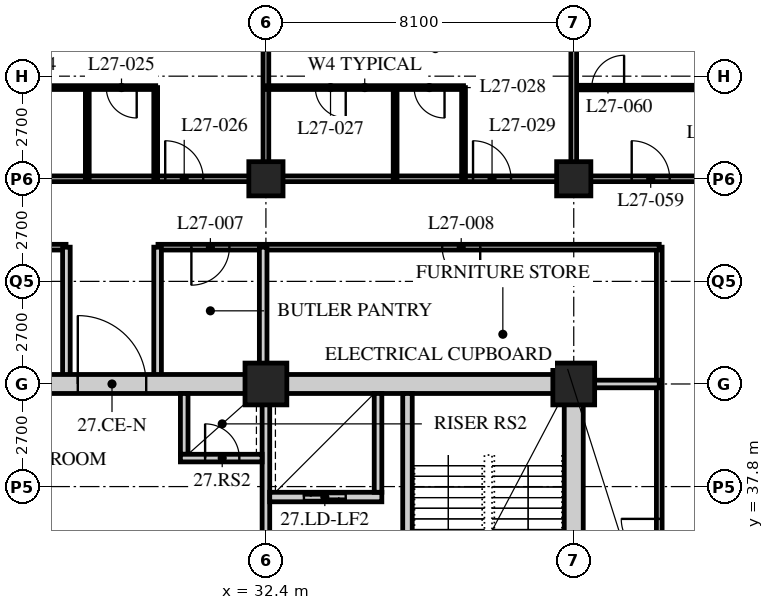
"""IFC4 building model, lengths in metres.
Left out: names, types, materials, properties, quantities, classifications, styles, units other than length and angle.
Written with IfcOpenShell. Run it as: python <this file> out.ifc"""

import sys

from ifc_helpers import new_model, si_unit, direction, frame, frame_2d, origin, origin_2d, place, context, subcontext, project, spatial, rectangle, hollow_rectangle, extrude, element, fill, save


model = new_model("IFC4")
c1 = context("Model", 3, precision=1e-05, world=origin(), true_north=direction((0.0, 1.0)))
c2 = subcontext(c1, "Body", "Model", "MODEL_VIEW")
j1 = project(units=[si_unit("LENGTHUNIT", "METRE"), si_unit("PLANEANGLEUNIT", "RADIAN")], contexts=[c1])
p1 = place(None, origin())
s1 = spatial("IfcSite", under=j1, at=p1, CompositionType="ELEMENT")
p2 = place(p1, origin())
s2 = spatial("IfcBuilding", under=s1, at=p2, CompositionType="ELEMENT")
p3 = place(p2, frame((0.0, 0.0, 110.2)))
s3 = spatial("IfcBuildingStorey", under=s2, at=p3, CompositionType="ELEMENT", Elevation=110.2)
p4 = place(p3, frame((32.4, 40.5, 0.0), z_axis=(0.0, 0.0, 1.0), x_axis=(1.0, 0.0, 0.0)))
e1 = element("IfcColumn", 1, at=p4, inside=s3, PredefinedType="COLUMN", context=c2, shape_type="SweptSolid", body=[
    extrude(hollow_rectangle(XDim=1.1, YDim=1.1, WallThickness=0.1, at=origin_2d()), origin(), (0.0, 0.0, 1.0), 3.4),
])
p5 = place(p3, frame((32.4, 45.9, 0.0), z_axis=(0.0, 0.0, 1.0), x_axis=(1.0, 0.0, 0.0)))
e2 = element("IfcColumn", 2, at=p5, inside=s3, PredefinedType="COLUMN", context=c2, shape_type="SweptSolid", body=[
    extrude(hollow_rectangle(XDim=0.9, YDim=0.9, WallThickness=0.09, at=origin_2d()), origin(), (0.0, 0.0, 1.0), 3.4),
])
p6 = place(p3, frame((40.5, 40.5, 0.0), z_axis=(0.0, 0.0, 1.0), x_axis=(1.0, 0.0, 0.0)))
e3 = element("IfcColumn", 3, at=p6, inside=s3, PredefinedType="COLUMN", context=c2, shape_type="SweptSolid", body=[
    extrude(hollow_rectangle(XDim=1.1, YDim=1.1, WallThickness=0.1, at=origin_2d()), origin(), (0.0, 0.0, 1.0), 3.4),
])
p7 = place(p3, frame((40.5, 45.9, 0.0), z_axis=(0.0, 0.0, 1.0), x_axis=(1.0, 0.0, 0.0)))
e4 = element("IfcColumn", 4, at=p7, inside=s3, PredefinedType="COLUMN", context=c2, shape_type="SweptSolid", body=[
    extrude(hollow_rectangle(XDim=0.9, YDim=0.9, WallThickness=0.09, at=origin_2d()), origin(), (0.0, 0.0, 1.0), 3.4),
])
p8 = place(p3, frame((12.15, 45.9, 0.0), z_axis=(0.0, 0.0, 1.0), x_axis=(1.0, 0.0, 0.0)))
e5 = element("IfcWall", 5, at=p8, inside=s3, PredefinedType="PARTITIONING", context=c2, shape_type="SweptSolid", body=[
    extrude(rectangle(XDim=32.4, YDim=0.15, at=frame_2d((16.2, 0.0))), origin(), (0.0, 0.0, 1.0), 2.578),
])
p9 = place(p8, frame((9.5, 0.0, 0.0)))
e6 = element("IfcOpeningElement", 6, at=p9, cuts=e5, PredefinedType="OPENING", context=c2, shape_type="SweptSolid", body=[
    extrude(rectangle(XDim=1.0, YDim=2.1, at=frame_2d((0.5, 1.05))), frame((0.0, 0.085, 0.0), z_axis=(0.0, -1.0, 0.0), x_axis=(1.0, 0.0, 0.0)), (0.0, 0.0, 1.0), 0.17),
])
p10 = place(p8, frame((17.6, 0.0, 0.0)))
e7 = element("IfcOpeningElement", 7, at=p10, cuts=e5, PredefinedType="OPENING", context=c2, shape_type="SweptSolid", body=[
    extrude(rectangle(XDim=1.0, YDim=2.1, at=frame_2d((0.5, 1.05))), frame((0.0, 0.085, 0.0), z_axis=(0.0, -1.0, 0.0), x_axis=(1.0, 0.0, 0.0)), (0.0, 0.0, 1.0), 0.17),
])
p11 = place(p8, frame((25.7, 0.0, 0.0)))
e8 = element("IfcOpeningElement", 8, at=p11, cuts=e5, PredefinedType="OPENING", context=c2, shape_type="SweptSolid", body=[
    extrude(rectangle(XDim=1.0, YDim=2.1, at=frame_2d((0.5, 1.05))), frame((0.0, 0.085, 0.0), z_axis=(0.0, -1.0, 0.0), x_axis=(1.0, 0.0, 0.0)), (0.0, 0.0, 1.0), 0.17),
])
p12 = place(p8, frame((29.875, 0.0, 0.0)))
e9 = element("IfcOpeningElement", 9, at=p12, cuts=e5, PredefinedType="OPENING", context=c2, shape_type="SweptSolid", body=[
    extrude(rectangle(XDim=1.0, YDim=2.1, at=frame_2d((0.5, 1.05))), frame((0.0, 0.085, 0.0), z_axis=(0.0, -1.0, 0.0), x_axis=(1.0, 0.0, 0.0)), (0.0, 0.0, 1.0), 0.17),
])
p13 = place(p8, frame((1.525, 0.0, 0.0)))
e10 = element("IfcOpeningElement", 10, at=p13, cuts=e5, PredefinedType="OPENING", context=c2, shape_type="SweptSolid", body=[
    extrude(rectangle(XDim=1.0, YDim=2.1, at=frame_2d((0.5, 1.05))), frame((0.0, 0.085, 0.0), z_axis=(0.0, -1.0, 0.0), x_axis=(1.0, 0.0, 0.0)), (0.0, 0.0, 1.0), 0.17),
])
p14 = place(p3, frame((42.75, 24.3, 0.0), z_axis=(0.0, 0.0, 1.0), x_axis=(0.0, 1.0, 0.0)))
e11 = element("IfcWall", 11, at=p14, inside=s3, PredefinedType="PARTITIONING", context=c2, shape_type="SweptSolid", body=[
    extrude(rectangle(XDim=19.8, YDim=0.15, at=frame_2d((9.9, 0.0))), origin(), (0.0, 0.0, 1.0), 3.19),
])
p15 = place(p14, frame((3.55, 0.0, 0.0)))
e12 = element("IfcOpeningElement", 12, at=p15, cuts=e11, PredefinedType="OPENING", context=c2, shape_type="SweptSolid", body=[
    extrude(rectangle(XDim=1.0, YDim=2.1, at=frame_2d((0.5, 1.05))), frame((0.0, 0.085, 0.0), z_axis=(0.0, -1.0, 0.0), x_axis=(1.0, 0.0, 0.0)), (0.0, 0.0, 1.0), 0.17),
])
p16 = place(p14, frame((11.65, 0.0, 0.0)))
e13 = element("IfcOpeningElement", 13, at=p16, cuts=e11, PredefinedType="OPENING", context=c2, shape_type="SweptSolid", body=[
    extrude(rectangle(XDim=1.0, YDim=2.1, at=frame_2d((0.5, 1.05))), frame((0.0, 0.085, 0.0), z_axis=(0.0, -1.0, 0.0), x_axis=(1.0, 0.0, 0.0)), (0.0, 0.0, 1.0), 0.17),
])
p17 = place(p3, frame((42.75, 44.1, 0.0), z_axis=(0.0, 0.0, 1.0), x_axis=(-1.0, 0.0, 0.0)))
e14 = element("IfcWall", 14, at=p17, inside=s3, PredefinedType="PARTITIONING", context=c2, shape_type="SweptSolid", body=[
    extrude(rectangle(XDim=13.19, YDim=0.15, at=frame_2d((6.595, 0.0))), origin(), (0.0, 0.0, 1.0), 3.19),
])
p18 = place(p17, frame((11.311, 0.0, 0.0)))
e15 = element("IfcOpeningElement", 15, at=p18, cuts=e14, PredefinedType="OPENING", context=c2, shape_type="SweptSolid", body=[
    extrude(rectangle(XDim=1.0, YDim=2.1, at=frame_2d((0.5, 1.05))), frame((0.0, 0.085, 0.0), z_axis=(0.0, -1.0, 0.0), x_axis=(1.0, 0.0, 0.0)), (0.0, 0.0, 1.0), 0.17),
])
p19 = place(p17, frame((4.711, 0.0, 0.0)))
e16 = element("IfcOpeningElement", 16, at=p19, cuts=e14, PredefinedType="OPENING", context=c2, shape_type="SweptSolid", body=[
    extrude(rectangle(XDim=1.0, YDim=2.1, at=frame_2d((0.5, 1.05))), frame((0.0, 0.085, 0.0), z_axis=(0.0, -1.0, 0.0), x_axis=(1.0, 0.0, 0.0)), (0.0, 0.0, 1.0), 0.17),
])
p20 = place(p3, frame((27.14, 44.1, 0.0), z_axis=(0.0, 0.0, 1.0), x_axis=(-1.0, 0.0, 0.0)))
e17 = element("IfcWall", 17, at=p20, inside=s3, PredefinedType="PARTITIONING", context=c2, shape_type="SweptSolid", body=[
    extrude(rectangle(XDim=13.19, YDim=0.15, at=frame_2d((6.595, 0.0))), origin(), (0.0, 0.0, 1.0), 3.19),
])
p21 = place(p20, frame((10.19, 0.0, 0.0)))
e18 = element("IfcOpeningElement", 18, at=p21, cuts=e17, PredefinedType="OPENING", context=c2, shape_type="SweptSolid", body=[
    extrude(rectangle(XDim=1.0, YDim=2.1, at=frame_2d((0.5, 1.05))), frame((0.0, 0.085, 0.0), z_axis=(0.0, -1.0, 0.0), x_axis=(1.0, 0.0, 0.0)), (0.0, 0.0, 1.0), 0.17),
])
p22 = place(p20, frame((3.59, 0.0, 0.0)))
e19 = element("IfcOpeningElement", 19, at=p22, cuts=e17, PredefinedType="OPENING", context=c2, shape_type="SweptSolid", body=[
    extrude(rectangle(XDim=1.0, YDim=2.1, at=frame_2d((0.5, 1.05))), frame((0.0, 0.085, 0.0), z_axis=(0.0, -1.0, 0.0), x_axis=(1.0, 0.0, 0.0)), (0.0, 0.0, 1.0), 0.17),
])
p23 = place(p3, frame((32.328, 44.1, 0.0), z_axis=(0.0, 0.0, 1.0), x_axis=(0.0, -1.0, 0.0)))
e20 = element("IfcWall", 20, at=p23, inside=s3, PredefinedType="SOLIDWALL", context=c2, shape_type="SweptSolid", body=[
    extrude(rectangle(XDim=3.6, YDim=0.2, at=frame_2d((1.8, 0.0))), origin(), (0.0, 0.0, 1.0), 2.578),
])
for number, where, z_axis, x_axis in (
    (21, (27.15, 40.5, 0.0), (0.0, 0.0, 1.0), (0.0, 1.0, 0.0)),
    (22, (29.55, 40.5, 0.0), (0.0, 0.0, 1.0), (0.0, 1.0, 0.0)),
):
    element("IfcWall", number, at=place(p3, frame(where, z_axis=z_axis, x_axis=x_axis)), inside=s3, PredefinedType="SOLIDWALL", context=c2, shape_type="SweptSolid", body=[
        extrude(rectangle(XDim=3.6, YDim=0.2, at=frame_2d((1.8, 0.0))), origin(), (0.0, 0.0, 1.0), 3.19),
    ])
p24 = place(p3, frame((40.5, 40.5, 0.0), z_axis=(0.0, 0.0, 1.0), x_axis=(1.0, 0.0, 0.0)))
e23 = element("IfcWall", 23, at=p24, inside=s3, PredefinedType="SOLIDWALL", context=c2, shape_type="SweptSolid", body=[
    extrude(rectangle(XDim=2.25, YDim=0.2, at=frame_2d((1.125, 0.0))), origin(), (0.0, 0.0, 1.0), 3.19),
])
p25 = place(p3, frame((24.3, 48.3, 0.0), z_axis=(0.0, 0.0, 1.0), x_axis=(1.0, 0.0, 0.0)))
e24 = element("IfcWall", 24, at=p25, inside=s3, PredefinedType="PARTITIONING", context=c2, shape_type="SweptSolid", body=[
    extrude(rectangle(XDim=5.2, YDim=0.1, at=frame_2d((2.6, 0.0))), origin(), (0.0, 0.0, 1.0), 3.19),
])
p26 = place(p25, frame((1.3, 0.0, 0.0)))
e25 = element("IfcOpeningElement", 25, at=p26, cuts=e24, PredefinedType="OPENING", context=c2, shape_type="SweptSolid", body=[
    extrude(rectangle(XDim=0.8, YDim=2.1, at=frame_2d((0.4, 1.05))), frame((0.0, 0.06, 0.0), z_axis=(0.0, -1.0, 0.0), x_axis=(1.0, 0.0, 0.0)), (0.0, 0.0, 1.0), 0.12),
])
p27 = place(p25, frame((3.9, 0.0, 0.0)))
e26 = element("IfcOpeningElement", 26, at=p27, cuts=e24, PredefinedType="OPENING", context=c2, shape_type="SweptSolid", body=[
    extrude(rectangle(XDim=0.8, YDim=2.1, at=frame_2d((0.4, 1.05))), frame((0.0, 0.06, 0.0), z_axis=(0.0, -1.0, 0.0), x_axis=(1.0, 0.0, 0.0)), (0.0, 0.0, 1.0), 0.12),
])
for number, where, z_axis, x_axis in (
    (27, (27.7, 45.9, 0.0), (0.0, 0.0, 1.0), (0.0, 1.0, 0.0)),
    (28, (29.5, 45.9, 0.0), (0.0, 0.0, 1.0), (0.0, 1.0, 0.0)),
):
    element("IfcWall", number, at=place(p3, frame(where, z_axis=z_axis, x_axis=x_axis)), inside=s3, PredefinedType="PARTITIONING", context=c2, shape_type="SweptSolid", body=[
        extrude(rectangle(XDim=2.4, YDim=0.1, at=frame_2d((1.2, 0.0))), origin(), (0.0, 0.0, 1.0), 3.19),
    ])
p28 = place(p3, frame((32.4, 45.9, 0.0), z_axis=(0.0, 0.0, 1.0), x_axis=(0.0, 1.0, 0.0)))
e29 = element("IfcWall", 29, at=p28, inside=s3, PredefinedType="PARTITIONING", context=c2, shape_type="SweptSolid", body=[
    extrude(rectangle(XDim=7.8, YDim=0.15, at=frame_2d((3.9, 0.0))), origin(), (0.0, 0.0, 1.0), 2.578),
])
p29 = place(p3, frame((32.4, 48.3, 0.0), z_axis=(0.0, 0.0, 1.0), x_axis=(1.0, 0.0, 0.0)))
e30 = element("IfcWall", 30, at=p29, inside=s3, PredefinedType="PARTITIONING", context=c2, shape_type="SweptSolid", body=[
    extrude(rectangle(XDim=5.2, YDim=0.1, at=frame_2d((2.6, 0.0))), origin(), (0.0, 0.0, 1.0), 3.19),
])
p30 = place(p29, frame((1.3, 0.0, 0.0)))
e31 = element("IfcOpeningElement", 31, at=p30, cuts=e30, PredefinedType="OPENING", context=c2, shape_type="SweptSolid", body=[
    extrude(rectangle(XDim=0.8, YDim=2.1, at=frame_2d((0.4, 1.05))), frame((0.0, 0.06, 0.0), z_axis=(0.0, -1.0, 0.0), x_axis=(1.0, 0.0, 0.0)), (0.0, 0.0, 1.0), 0.12),
])
p31 = place(p29, frame((3.9, 0.0, 0.0)))
e32 = element("IfcOpeningElement", 32, at=p31, cuts=e30, PredefinedType="OPENING", context=c2, shape_type="SweptSolid", body=[
    extrude(rectangle(XDim=0.8, YDim=2.1, at=frame_2d((0.4, 1.05))), frame((0.0, 0.06, 0.0), z_axis=(0.0, -1.0, 0.0), x_axis=(1.0, 0.0, 0.0)), (0.0, 0.0, 1.0), 0.12),
])
for number, where, z_axis, x_axis in (
    (33, (35.8, 45.9, 0.0), (0.0, 0.0, 1.0), (0.0, 1.0, 0.0)),
    (34, (37.6, 45.9, 0.0), (0.0, 0.0, 1.0), (0.0, 1.0, 0.0)),
):
    element("IfcWall", number, at=place(p3, frame(where, z_axis=z_axis, x_axis=x_axis)), inside=s3, PredefinedType="PARTITIONING", context=c2, shape_type="SweptSolid", body=[
        extrude(rectangle(XDim=2.4, YDim=0.1, at=frame_2d((1.2, 0.0))), origin(), (0.0, 0.0, 1.0), 3.19),
    ])
p32 = place(p3, frame((40.5, 48.3, 0.0), z_axis=(0.0, 0.0, 1.0), x_axis=(1.0, 0.0, 0.0)))
e35 = element("IfcWall", 35, at=p32, inside=s3, PredefinedType="PARTITIONING", context=c2, shape_type="SweptSolid", body=[
    extrude(rectangle(XDim=8.05, YDim=0.12, at=frame_2d((4.025, 0.0))), origin(), (0.0, 0.0, 1.0), 3.19),
])
p33 = place(p32, frame((0.475, 0.0, 0.0)))
e36 = element("IfcOpeningElement", 36, at=p33, cuts=e35, PredefinedType="OPENING", context=c2, shape_type="SweptSolid", body=[
    extrude(rectangle(XDim=0.85, YDim=2.1, at=frame_2d((0.425, 1.05))), frame((0.0, 0.07, 0.0), z_axis=(0.0, -1.0, 0.0), x_axis=(1.0, 0.0, 0.0)), (0.0, 0.0, 1.0), 0.14),
])
p34 = place(p32, frame((4.325, 0.0, 0.0)))
e37 = element("IfcOpeningElement", 37, at=p34, cuts=e35, PredefinedType="OPENING", context=c2, shape_type="SweptSolid", body=[
    extrude(rectangle(XDim=0.85, YDim=2.1, at=frame_2d((0.425, 1.05))), frame((0.0, 0.07, 0.0), z_axis=(0.0, -1.0, 0.0), x_axis=(1.0, 0.0, 0.0)), (0.0, 0.0, 1.0), 0.14),
])
p35 = place(p3, frame((40.5, 45.9, 0.0), z_axis=(0.0, 0.0, 1.0), x_axis=(0.0, 1.0, 0.0)))
e38 = element("IfcWall", 38, at=p35, inside=s3, PredefinedType="PARTITIONING", context=c2, shape_type="SweptSolid", body=[
    extrude(rectangle(XDim=7.8, YDim=0.15, at=frame_2d((3.9, 0.0))), origin(), (0.0, 0.0, 1.0), 2.578),
])
p36 = place(p3, frame((15.95, 40.5, 0.0), z_axis=(0.0, 0.0, 1.0), x_axis=(1.0, 0.0, 0.0)))
e39 = element("IfcWall", 39, at=p36, inside=s3, PredefinedType="SOLIDWALL", context=c2, shape_type="SweptSolid", body=[
    extrude(rectangle(XDim=24.8, YDim=0.5, at=frame_2d((12.4, 0.0))), origin(), (0.0, 0.0, 1.0), 2.54),
])
p37 = place(p36, frame((11.5, 0.0, 0.0)))
e40 = element("IfcOpeningElement", 40, at=p37, cuts=e39, PredefinedType="OPENING", context=c2, shape_type="SweptSolid", body=[
    extrude(rectangle(XDim=1.8, YDim=2.4, at=frame_2d((0.9, 1.2))), frame((0.0, 0.26, 0.0), z_axis=(0.0, -1.0, 0.0), x_axis=(1.0, 0.0, 0.0)), (0.0, 0.0, 1.0), 0.52),
])
p38 = place(p3, frame((40.5, 24.55, 0.0), z_axis=(0.0, 0.0, 1.0), x_axis=(0.0, 1.0, 0.0)))
e41 = element("IfcWall", 41, at=p38, inside=s3, PredefinedType="SOLIDWALL", context=c2, shape_type="SweptSolid", body=[
    extrude(rectangle(XDim=15.7, YDim=0.5, at=frame_2d((7.85, 0.0))), origin(), (0.0, 0.0, 1.0), 2.578),
])
p39 = place(p3, frame((32.4, 32.5, 0.0), z_axis=(0.0, 0.0, 1.0), x_axis=(0.0, 1.0, 0.0)))
e42 = element("IfcWall", 42, at=p39, inside=s3, PredefinedType="SOLIDWALL", context=c2, shape_type="SweptSolid", body=[
    extrude(rectangle(XDim=7.75, YDim=0.2, at=frame_2d((3.875, 0.0))), origin(), (0.0, 0.0, 1.0), 2.578),
])
p40 = place(p39, frame((1.9, 0.0, 0.0)))
e43 = element("IfcOpeningElement", 43, at=p40, cuts=e42, PredefinedType="OPENING", context=c2, shape_type="SweptSolid", body=[
    extrude(rectangle(XDim=1.2, YDim=2.1, at=frame_2d((0.6, 1.05))), frame((0.0, 0.11, 0.0), z_axis=(0.0, -1.0, 0.0), x_axis=(1.0, 0.0, 0.0)), (0.0, 0.0, 1.0), 0.22),
])
p41 = place(p3, frame((36.125, 32.5, 0.0), z_axis=(0.0, 0.0, 1.0), x_axis=(0.0, 1.0, 0.0)))
e44 = element("IfcWall", 44, at=p41, inside=s3, PredefinedType="SOLIDWALL", context=c2, shape_type="SweptSolid", body=[
    extrude(rectangle(XDim=7.75, YDim=0.25, at=frame_2d((3.875, 0.0))), origin(), (0.0, 0.0, 1.0), 3.19),
])
p42 = place(p41, frame((0.45, 0.0, 0.0)))
e45 = element("IfcOpeningElement", 45, at=p42, cuts=e44, PredefinedType="OPENING", context=c2, shape_type="SweptSolid", body=[
    extrude(rectangle(XDim=1.2, YDim=2.1, at=frame_2d((0.6, 1.05))), frame((0.0, 0.135, 0.0), z_axis=(0.0, -1.0, 0.0), x_axis=(1.0, 0.0, 0.0)), (0.0, 0.0, 1.0), 0.27),
])
p43 = place(p3, frame((32.5, 37.525, 0.0), z_axis=(0.0, 0.0, 1.0), x_axis=(1.0, 0.0, 0.0)))
e46 = element("IfcWall", 46, at=p43, inside=s3, PredefinedType="SOLIDWALL", context=c2, shape_type="SweptSolid", body=[
    extrude(rectangle(XDim=2.95, YDim=0.25, at=frame_2d((1.475, 0.0))), origin(), (0.0, 0.0, 1.0), 3.19),
])
p44 = place(p43, frame((0.9, 0.0, 0.0)))
e47 = element("IfcOpeningElement", 47, at=p44, cuts=e46, PredefinedType="OPENING", context=c2, shape_type="SweptSolid", body=[
    extrude(rectangle(XDim=1.1, YDim=2.4, at=frame_2d((0.55, 1.2))), frame((0.0, 0.135, 0.0), z_axis=(0.0, -1.0, 0.0), x_axis=(1.0, 0.0, 0.0)), (0.0, 0.0, 1.0), 0.27),
])
p45 = place(p3, frame((35.35, 37.65, 0.0), z_axis=(0.0, 0.0, 1.0), x_axis=(0.0, 1.0, 0.0)))
e48 = element("IfcWall", 48, at=p45, inside=s3, PredefinedType="SOLIDWALL", context=c2, shape_type="SweptSolid", body=[
    extrude(rectangle(XDim=2.6, YDim=0.2, at=frame_2d((1.3, 0.0))), origin(), (0.0, 0.0, 1.0), 3.19),
])
p46 = place(p3, frame((30.25, 38.65, 0.0), z_axis=(0.0, 0.0, 1.0), x_axis=(0.0, 1.0, 0.0)))
e49 = element("IfcWall", 49, at=p46, inside=s3, PredefinedType="SOLIDWALL", context=c2, shape_type="SweptSolid", body=[
    extrude(rectangle(XDim=1.6, YDim=0.2, at=frame_2d((0.8, 0.0))), origin(), (0.0, 0.0, 1.0), 3.19),
])
p47 = place(p3, frame((30.15, 38.55, 0.0), z_axis=(0.0, 0.0, 1.0), x_axis=(1.0, 0.0, 0.0)))
e50 = element("IfcWall", 50, at=p47, inside=s3, PredefinedType="SOLIDWALL", context=c2, shape_type="SweptSolid", body=[
    extrude(rectangle(XDim=2.15, YDim=0.2, at=frame_2d((1.075, 0.0))), origin(), (0.0, 0.0, 1.0), 3.19),
])
p48 = place(p47, frame((0.65, 0.0, 0.0)))
e51 = element("IfcOpeningElement", 51, at=p48, cuts=e50, PredefinedType="OPENING", context=c2, shape_type="SweptSolid", body=[
    extrude(rectangle(XDim=0.9, YDim=2.1, at=frame_2d((0.45, 1.05))), frame((0.0, 0.11, 0.0), z_axis=(0.0, -1.0, 0.0), x_axis=(1.0, 0.0, 0.0)), (0.0, 0.0, 1.0), 0.22),
])
p49 = place(p16, origin())
e52 = element("IfcDoor", 52, at=p49, inside=s3, OperationType="SINGLE_SWING_RIGHT", PredefinedType="DOOR", context=c2, shape_type="SweptSolid", body=[
    extrude(rectangle(XDim=1.0, YDim=2.1, at=frame_2d((0.5, 1.05))), frame((0.0, 0.025, 0.0), z_axis=(0.0, -1.0, 0.0), x_axis=(1.0, 0.0, 0.0)), (0.0, 0.0, 1.0), 0.05),
])
fill(e13, e52)
p50 = place(p18, origin())
e53 = element("IfcDoor", 53, at=p50, inside=s3, OperationType="SINGLE_SWING_RIGHT", PredefinedType="DOOR", context=c2, shape_type="SweptSolid", body=[
    extrude(rectangle(XDim=1.0, YDim=2.1, at=frame_2d((0.5, 1.05))), frame((0.0, 0.025, 0.0), z_axis=(0.0, -1.0, 0.0), x_axis=(1.0, 0.0, 0.0)), (0.0, 0.0, 1.0), 0.05),
])
fill(e15, e53)
p51 = place(p19, origin())
e54 = element("IfcDoor", 54, at=p51, inside=s3, OperationType="SINGLE_SWING_LEFT", PredefinedType="DOOR", context=c2, shape_type="SweptSolid", body=[
    extrude(rectangle(XDim=1.0, YDim=2.1, at=frame_2d((0.5, 1.05))), frame((0.0, 0.025, 0.0), z_axis=(0.0, -1.0, 0.0), x_axis=(1.0, 0.0, 0.0)), (0.0, 0.0, 1.0), 0.05),
])
fill(e16, e54)
p52 = place(p27, origin())
e55 = element("IfcDoor", 55, at=p52, inside=s3, OperationType="SINGLE_SWING_LEFT", PredefinedType="DOOR", context=c2, shape_type="SweptSolid", body=[
    extrude(rectangle(XDim=0.8, YDim=2.1, at=frame_2d((0.4, 1.05))), frame((0.0, 0.025, 0.0), z_axis=(0.0, -1.0, 0.0), x_axis=(1.0, 0.0, 0.0)), (0.0, 0.0, 1.0), 0.05),
])
fill(e26, e55)
p53 = place(p10, origin())
e56 = element("IfcDoor", 56, at=p53, inside=s3, OperationType="SINGLE_SWING_LEFT", PredefinedType="DOOR", context=c2, shape_type="SweptSolid", body=[
    extrude(rectangle(XDim=1.0, YDim=2.1, at=frame_2d((0.5, 1.05))), frame((0.0, 0.025, 0.0), z_axis=(0.0, -1.0, 0.0), x_axis=(1.0, 0.0, 0.0)), (0.0, 0.0, 1.0), 0.05),
])
fill(e7, e56)
p54 = place(p30, origin())
e57 = element("IfcDoor", 57, at=p54, inside=s3, OperationType="SINGLE_SWING_LEFT", PredefinedType="DOOR", context=c2, shape_type="SweptSolid", body=[
    extrude(rectangle(XDim=0.8, YDim=2.1, at=frame_2d((0.4, 1.05))), frame((0.0, 0.025, 0.0), z_axis=(0.0, -1.0, 0.0), x_axis=(1.0, 0.0, 0.0)), (0.0, 0.0, 1.0), 0.05),
])
fill(e31, e57)
p55 = place(p31, origin())
e58 = element("IfcDoor", 58, at=p55, inside=s3, OperationType="SINGLE_SWING_LEFT", PredefinedType="DOOR", context=c2, shape_type="SweptSolid", body=[
    extrude(rectangle(XDim=0.8, YDim=2.1, at=frame_2d((0.4, 1.05))), frame((0.0, 0.025, 0.0), z_axis=(0.0, -1.0, 0.0), x_axis=(1.0, 0.0, 0.0)), (0.0, 0.0, 1.0), 0.05),
])
fill(e32, e58)
p56 = place(p11, origin())
e59 = element("IfcDoor", 59, at=p56, inside=s3, OperationType="SINGLE_SWING_LEFT", PredefinedType="DOOR", context=c2, shape_type="SweptSolid", body=[
    extrude(rectangle(XDim=1.0, YDim=2.1, at=frame_2d((0.5, 1.05))), frame((0.0, 0.025, 0.0), z_axis=(0.0, -1.0, 0.0), x_axis=(1.0, 0.0, 0.0)), (0.0, 0.0, 1.0), 0.05),
])
fill(e8, e59)
p57 = place(p12, origin())
e60 = element("IfcDoor", 60, at=p57, inside=s3, OperationType="SINGLE_SWING_LEFT", PredefinedType="DOOR", context=c2, shape_type="SweptSolid", body=[
    extrude(rectangle(XDim=1.0, YDim=2.1, at=frame_2d((0.5, 1.05))), frame((0.0, 0.025, 0.0), z_axis=(0.0, -1.0, 0.0), x_axis=(1.0, 0.0, 0.0)), (0.0, 0.0, 1.0), 0.05),
])
fill(e9, e60)
p58 = place(p33, origin())
e61 = element("IfcDoor", 61, at=p58, inside=s3, OperationType="SINGLE_SWING_RIGHT", PredefinedType="DOOR", context=c2, shape_type="SweptSolid", body=[
    extrude(rectangle(XDim=0.85, YDim=2.1, at=frame_2d((0.425, 1.05))), frame((0.0, 0.025, 0.0), z_axis=(0.0, -1.0, 0.0), x_axis=(1.0, 0.0, 0.0)), (0.0, 0.0, 1.0), 0.05),
])
fill(e36, e61)
p59 = place(p48, origin())
e62 = element("IfcDoor", 62, at=p59, inside=s3, OperationType="SINGLE_SWING_LEFT", PredefinedType="DOOR", context=c2, shape_type="SweptSolid", body=[
    extrude(rectangle(XDim=0.9, YDim=2.1, at=frame_2d((0.45, 1.05))), frame((0.0, 0.025, 0.0), z_axis=(0.0, -1.0, 0.0), x_axis=(1.0, 0.0, 0.0)), (0.0, 0.0, 1.0), 0.05),
])
fill(e51, e62)
p60 = place(p44, origin())
e63 = element("IfcDoor", 63, at=p60, inside=s3, OperationType="DOUBLE_DOOR_SLIDING", PredefinedType="DOOR", context=c2, shape_type="SweptSolid", body=[
    extrude(rectangle(XDim=1.1, YDim=2.4, at=frame_2d((0.55, 1.2))), frame((0.0, 0.025, 0.0), z_axis=(0.0, -1.0, 0.0), x_axis=(1.0, 0.0, 0.0)), (0.0, 0.0, 1.0), 0.05),
])
fill(e47, e63)
p61 = place(p37, origin())
e64 = element("IfcDoor", 64, at=p61, inside=s3, OperationType="DOUBLE_DOOR_SINGLE_SWING", PredefinedType="DOOR", context=c2, shape_type="SweptSolid", body=[
    extrude(rectangle(XDim=1.8, YDim=2.4, at=frame_2d((0.9, 1.2))), frame((0.0, 0.025, 0.0), z_axis=(0.0, -1.0, 0.0), x_axis=(1.0, 0.0, 0.0)), (0.0, 0.0, 1.0), 0.05),
])
fill(e40, e64)
save(model, sys.argv[1])
